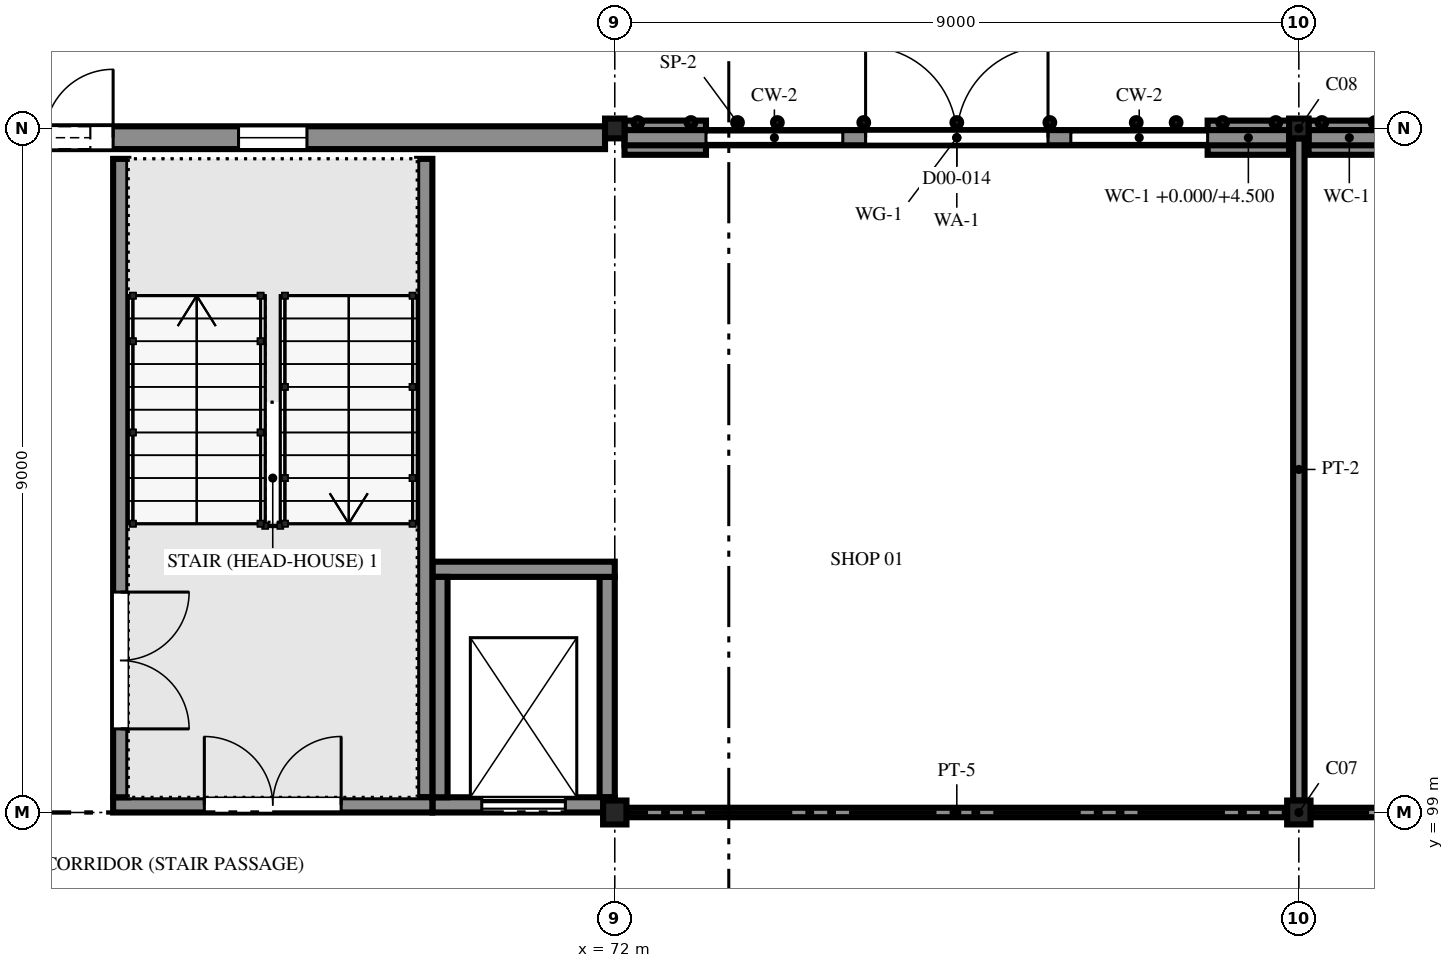
"""IFC4 building model, lengths in metres.
Left out: names, types, materials, properties, quantities, classifications, styles, units other than length and angle.
Written with IfcOpenShell. Run it as: python <this file> out.ifc"""

import sys

from ifc_helpers import new_model, si_unit, direction, frame, frame_2d, origin, origin_2d, place, context, subcontext, project, spatial, polyline, rectangle, i_section, outline, extrude, element, fill, save


model = new_model("IFC4")
c1 = context("Model", 3, precision=1e-05, world=origin(), true_north=direction((0.0, 1.0)))
c2 = subcontext(c1, "Body", "Model", "MODEL_VIEW")
j1 = project(units=[si_unit("LENGTHUNIT", "METRE"), si_unit("PLANEANGLEUNIT", "RADIAN")], contexts=[c1])
p1 = place(None, origin())
s1 = spatial("IfcSite", under=j1, at=p1, CompositionType="ELEMENT")
p2 = place(p1, origin())
s2 = spatial("IfcBuilding", under=s1, at=p2, CompositionType="ELEMENT")
p3 = place(p2, origin())
s3 = spatial("IfcBuildingStorey", under=s2, at=p3, CompositionType="ELEMENT", Elevation=0.0)
p4 = place(p3, frame((72.0, 99.0, -2.1), z_axis=(0.0, 0.0, 1.0), x_axis=(1.0, 0.0, 0.0)))
e1 = element("IfcColumn", 1, at=p4, inside=s3, PredefinedType="COLUMN", context=c2, shape_type="SweptSolid", body=[
    extrude(i_section(OverallWidth=0.307, OverallDepth=0.314, WebThickness=0.012, FlangeThickness=0.019, FilletRadius=0.015, at=origin_2d()), origin(), (0.0, 0.0, 1.0), 9.6),
])
p5 = place(p3, frame((72.0, 108.0, -2.1), z_axis=(0.0, 0.0, 1.0), x_axis=(1.0, 0.0, 0.0)))
e2 = element("IfcColumn", 2, at=p5, inside=s3, PredefinedType="COLUMN", context=c2, shape_type="SweptSolid", body=[
    extrude(i_section(OverallWidth=0.256, OverallDepth=0.26, WebThickness=0.01, FlangeThickness=0.017, FilletRadius=0.013, at=origin_2d()), origin(), (0.0, 0.0, 1.0), 9.6),
])
p6 = place(p3, frame((81.0, 99.0, -2.1), z_axis=(0.0, 0.0, 1.0), x_axis=(1.0, 0.0, 0.0)))
e3 = element("IfcColumn", 3, at=p6, inside=s3, PredefinedType="COLUMN", context=c2, shape_type="SweptSolid", body=[
    extrude(i_section(OverallWidth=0.307, OverallDepth=0.314, WebThickness=0.012, FlangeThickness=0.019, FilletRadius=0.015, at=origin_2d()), origin(), (0.0, 0.0, 1.0), 9.6),
])
p7 = place(p3, frame((81.0, 108.0, -2.1), z_axis=(0.0, 0.0, 1.0), x_axis=(1.0, 0.0, 0.0)))
e4 = element("IfcColumn", 4, at=p7, inside=s3, PredefinedType="COLUMN", context=c2, shape_type="SweptSolid", body=[
    extrude(i_section(OverallWidth=0.256, OverallDepth=0.26, WebThickness=0.01, FlangeThickness=0.017, FilletRadius=0.013, at=origin_2d()), origin(), (0.0, 0.0, 1.0), 9.6),
])
p8 = place(p3, frame((63.128, 107.878, 0.0), z_axis=(0.0, 0.0, 1.0), x_axis=(1.0, 0.0, 0.0)))
e5 = element("IfcWall", 5, at=p8, inside=s3, PredefinedType="SOLIDWALL", context=c2, shape_type="SweptSolid", body=[
    extrude(rectangle(XDim=8.744, YDim=0.3, at=frame_2d((4.372, 0.0))), origin(), (0.0, 0.0, 1.0), 6.692),
])
p9 = place(p8, frame((0.472, 0.0, 0.0)))
e6 = element("IfcOpeningElement", 6, at=p9, cuts=e5, PredefinedType="OPENING", context=c2, shape_type="SweptSolid", body=[
    extrude(rectangle(XDim=1.8, YDim=2.4, at=frame_2d((0.9, 1.2))), frame((0.0, 0.16, 0.0), z_axis=(0.0, -1.0, 0.0), x_axis=(1.0, 0.0, 0.0)), (0.0, 0.0, 1.0), 0.32),
])
p10 = place(p8, frame((0.772, 0.0, 2.55)))
e7 = element("IfcOpeningElement", 7, at=p10, cuts=e5, PredefinedType="OPENING", context=c2, shape_type="SweptSolid", body=[
    extrude(rectangle(XDim=1.2, YDim=0.6, at=frame_2d((0.6, 0.3))), frame((0.0, 0.16, 0.0), z_axis=(0.0, -1.0, 0.0), x_axis=(1.0, 0.0, 0.0)), (0.0, 0.0, 1.0), 0.32),
])
p11 = place(p8, frame((3.922, 0.0, 1.2)))
e8 = element("IfcOpeningElement", 8, at=p11, cuts=e5, PredefinedType="OPENING", context=c2, shape_type="SweptSolid", body=[
    extrude(rectangle(XDim=0.9, YDim=1.8, at=frame_2d((0.45, 0.9))), frame((0.0, 0.16, 0.0), z_axis=(0.0, -1.0, 0.0), x_axis=(1.0, 0.0, 0.0)), (0.0, 0.0, 1.0), 0.32),
])
p12 = place(p3, frame((72.128, 107.878, 0.0), z_axis=(0.0, 0.0, 1.0), x_axis=(1.0, 0.0, 0.0)))
e9 = element("IfcWall", 9, at=p12, inside=s3, PredefinedType="SOLIDWALL", context=c2, shape_type="SweptSolid", body=[
    extrude(rectangle(XDim=1.072, YDim=0.45, at=frame_2d((0.536, 0.0))), origin(), (0.0, 0.0, 1.0), 4.5),
])
p13 = place(p3, frame((75.0, 107.878, 0.0), z_axis=(0.0, 0.0, 1.0), x_axis=(1.0, 0.0, 0.0)))
e10 = element("IfcWall", 10, at=p13, inside=s3, PredefinedType="ELEMENTEDWALL", context=c2, shape_type="SweptSolid", body=[
    extrude(rectangle(XDim=3.0, YDim=0.15, at=frame_2d((1.5, 0.0))), origin(), (0.0, 0.0, 1.0), 4.5),
])
p14 = place(p13, frame((0.3, 0.0, 0.0)))
e11 = element("IfcOpeningElement", 11, at=p14, cuts=e10, PredefinedType="OPENING", context=c2, shape_type="SweptSolid", body=[
    extrude(rectangle(XDim=2.4, YDim=2.7, at=frame_2d((1.2, 1.35))), frame((0.0, 0.085, 0.0), z_axis=(0.0, -1.0, 0.0), x_axis=(1.0, 0.0, 0.0)), (0.0, 0.0, 1.0), 0.17),
])
p15 = place(p3, frame((79.8, 107.878, 0.0), z_axis=(0.0, 0.0, 1.0), x_axis=(1.0, 0.0, 0.0)))
e12 = element("IfcWall", 12, at=p15, inside=s3, PredefinedType="SOLIDWALL", context=c2, shape_type="SweptSolid", body=[
    extrude(rectangle(XDim=1.072, YDim=0.45, at=frame_2d((0.536, 0.0))), origin(), (0.0, 0.0, 1.0), 4.5),
])
p16 = place(p3, frame((72.128, 107.878, 4.9), z_axis=(0.0, 0.0, 1.0), x_axis=(1.0, 0.0, 0.0)))
e13 = element("IfcWall", 13, at=p16, inside=s3, PredefinedType="SOLIDWALL", context=c2, shape_type="SweptSolid", body=[
    extrude(rectangle(XDim=8.744, YDim=0.2, at=frame_2d((4.372, 0.0))), origin(), (0.0, 0.0, 1.0), 1.792),
])
p17 = place(p3, frame((81.128, 107.878, 0.0), z_axis=(0.0, 0.0, 1.0), x_axis=(1.0, 0.0, 0.0)))
e14 = element("IfcWall", 14, at=p17, inside=s3, PredefinedType="SOLIDWALL", context=c2, shape_type="SweptSolid", body=[
    extrude(rectangle(XDim=1.072, YDim=0.45, at=frame_2d((0.536, 0.0))), origin(), (0.0, 0.0, 1.0), 4.5),
])
p18 = place(p3, frame((81.128, 107.878, 4.9), z_axis=(0.0, 0.0, 1.0), x_axis=(1.0, 0.0, 0.0)))
e15 = element("IfcWall", 15, at=p18, inside=s3, PredefinedType="SOLIDWALL", context=c2, shape_type="SweptSolid", body=[
    extrude(rectangle(XDim=8.744, YDim=0.2, at=frame_2d((4.372, 0.0))), origin(), (0.0, 0.0, 1.0), 1.792),
])
p19 = place(p3, frame((65.4, 99.1, 0.0), z_axis=(0.0, 0.0, 1.0), x_axis=(1.0, 0.0, 0.0)))
e16 = element("IfcWall", 16, at=p19, inside=s3, PredefinedType="SOLIDWALL", context=c2, shape_type="SweptSolid", body=[
    extrude(rectangle(XDim=4.2, YDim=0.2, at=frame_2d((2.1, 0.0))), origin(), (0.0, 0.0, 1.0), 6.757),
])
p20 = place(p19, frame((1.2, 0.0, 0.0)))
e17 = element("IfcOpeningElement", 17, at=p20, cuts=e16, PredefinedType="OPENING", context=c2, shape_type="SweptSolid", body=[
    extrude(rectangle(XDim=1.8, YDim=2.1, at=frame_2d((0.9, 1.05))), frame((0.0, 0.11, 0.0), z_axis=(0.0, -1.0, 0.0), x_axis=(1.0, 0.0, 0.0)), (0.0, 0.0, 1.0), 0.22),
])
p21 = place(p3, frame((65.5, 99.2, 0.0), z_axis=(0.0, 0.0, 1.0), x_axis=(0.0, 1.0, 0.0)))
e18 = element("IfcWall", 18, at=p21, inside=s3, PredefinedType="SOLIDWALL", context=c2, shape_type="SweptSolid", body=[
    extrude(rectangle(XDim=8.4, YDim=0.2, at=frame_2d((4.2, 0.0))), origin(), (0.0, 0.0, 1.0), 6.757),
])
p22 = place(p21, frame((0.9, 0.0, 0.0)))
e19 = element("IfcOpeningElement", 19, at=p22, cuts=e18, PredefinedType="OPENING", context=c2, shape_type="SweptSolid", body=[
    extrude(rectangle(XDim=1.8, YDim=2.1, at=frame_2d((0.9, 1.05))), frame((0.0, 0.11, 0.0), z_axis=(0.0, -1.0, 0.0), x_axis=(1.0, 0.0, 0.0)), (0.0, 0.0, 1.0), 0.22),
])
p23 = place(p3, frame((69.5, 99.2, 0.0), z_axis=(0.0, 0.0, 1.0), x_axis=(0.0, 1.0, 0.0)))
e20 = element("IfcWall", 20, at=p23, inside=s3, PredefinedType="SOLIDWALL", context=c2, shape_type="SweptSolid", body=[
    extrude(rectangle(XDim=8.4, YDim=0.2, at=frame_2d((4.2, 0.0))), origin(), (0.0, 0.0, 1.0), 6.757),
])
p24 = place(p3, frame((69.602, 99.1, -1.6), z_axis=(0.0, 0.0, 1.0), x_axis=(1.0, 0.0, 0.0)))
e21 = element("IfcWall", 21, at=p24, inside=s3, PredefinedType="SOLIDWALL", context=c2, shape_type="SweptSolid", body=[
    extrude(rectangle(XDim=2.398, YDim=0.2, at=frame_2d((1.199, 0.0))), origin(), (0.0, 0.0, 1.0), 8.357),
])
p25 = place(p24, frame((0.648, 0.0, 1.6)))
e22 = element("IfcOpeningElement", 22, at=p25, cuts=e21, PredefinedType="OPENING", context=c2, shape_type="SweptSolid", body=[
    extrude(rectangle(XDim=1.1, YDim=2.1, at=frame_2d((0.55, 1.05))), frame((0.0, 0.11, 0.0), z_axis=(0.0, -1.0, 0.0), x_axis=(1.0, 0.0, 0.0)), (0.0, 0.0, 1.0), 0.22),
])
p26 = place(p3, frame((69.602, 102.2, -1.6), z_axis=(0.0, 0.0, 1.0), x_axis=(1.0, 0.0, 0.0)))
e23 = element("IfcWall", 23, at=p26, inside=s3, PredefinedType="SOLIDWALL", context=c2, shape_type="SweptSolid", body=[
    extrude(rectangle(XDim=2.398, YDim=0.2, at=frame_2d((1.199, 0.0))), origin(), (0.0, 0.0, 1.0), 8.357),
])
for number, where, z_axis, x_axis in (
    (24, (69.7, 99.2, -1.6), (0.0, 0.0, 1.0), (0.0, 1.0, 0.0)),
    (25, (71.9, 99.2, -1.6), (0.0, 0.0, 1.0), (0.0, 1.0, 0.0)),
):
    element("IfcWall", number, at=place(p3, frame(where, z_axis=z_axis, x_axis=x_axis)), inside=s3, PredefinedType="SOLIDWALL", context=c2, shape_type="SweptSolid", body=[
        extrude(rectangle(XDim=2.9, YDim=0.2, at=frame_2d((1.45, 0.0))), origin(), (0.0, 0.0, 1.0), 8.357),
    ])
for number, where, z_axis, x_axis in (
    (26, (72.154, 99.0, 0.0), (0.0, 0.0, 1.0), (1.0, 0.0, 0.0)),
    (27, (81.154, 99.0, 0.0), (0.0, 0.0, 1.0), (1.0, 0.0, 0.0)),
):
    element("IfcWall", number, at=place(p3, frame(where, z_axis=z_axis, x_axis=x_axis)), inside=s3, PredefinedType="PARTITIONING", context=c2, shape_type="SweptSolid", body=[
        extrude(rectangle(XDim=8.692, YDim=0.125, at=frame_2d((4.346, 0.0))), origin(), (0.0, 0.0, 1.0), 6.757),
    ])
p27 = place(p3, frame((81.0, 107.87, 0.0), z_axis=(0.0, 0.0, 1.0), x_axis=(0.0, -1.0, 0.0)))
e28 = element("IfcWall", 28, at=p27, inside=s3, PredefinedType="PARTITIONING", context=c2, shape_type="SweptSolid", body=[
    extrude(rectangle(XDim=8.713, YDim=0.15, at=frame_2d((4.356, 0.0))), origin(), (0.0, 0.0, 1.0), 6.6),
])
p28 = place(p9, origin())
e29 = element("IfcDoor", 29, at=p28, inside=s3, OperationType="DOUBLE_DOOR_SINGLE_SWING", PredefinedType="DOOR", context=c2, shape_type="SweptSolid", body=[
    extrude(outline(polyline([(0.0, 0.0), (0.07, 0.0), (0.07, 2.33), (1.73, 2.33), (1.73, 0.0), (1.8, 0.0), (1.8, 2.4), (0.0, 2.4), (0.0, 0.0)])), frame((0.0, 0.025, 0.0), z_axis=(0.0, -1.0, 0.0), x_axis=(1.0, 0.0, 0.0)), (0.0, 0.0, 1.0), 0.05),
    extrude(outline(polyline([(0.074, 0.01), (0.897, 0.01), (0.897, 2.326), (0.074, 2.326), (0.074, 0.01)]), holes=[polyline([(0.194, 0.16), (0.777, 0.16), (0.777, 1.01), (0.194, 1.01), (0.194, 0.16)]), polyline([(0.335, 1.16), (0.635, 1.16), (0.635, 1.76), (0.335, 1.76), (0.335, 1.16)])]), frame((0.0, 0.017, 0.0), z_axis=(0.0, -1.0, 0.0), x_axis=(1.0, 0.0, 0.0)), (0.0, 0.0, 1.0), 0.035),
    extrude(rectangle(XDim=0.583, YDim=0.85, at=frame_2d((0.485, 0.585))), frame((0.0, 0.009, 0.0), z_axis=(0.0, -1.0, 0.0), x_axis=(1.0, 0.0, 0.0)), (0.0, 0.0, 1.0), 0.017),
    extrude(rectangle(XDim=0.3, YDim=0.6, at=frame_2d((0.485, 1.46))), frame((0.0, 0.006, 0.0), z_axis=(0.0, -1.0, 0.0), x_axis=(1.0, 0.0, 0.0)), (0.0, 0.0, 1.0), 0.012),
    extrude(outline(polyline([(0.903, 0.01), (1.726, 0.01), (1.726, 2.326), (0.903, 2.326), (0.903, 0.01)]), holes=[polyline([(1.023, 0.16), (1.606, 0.16), (1.606, 1.01), (1.023, 1.01), (1.023, 0.16)]), polyline([(1.165, 1.16), (1.465, 1.16), (1.465, 1.76), (1.165, 1.76), (1.165, 1.16)])]), frame((0.0, 0.017, 0.0), z_axis=(0.0, -1.0, 0.0), x_axis=(1.0, 0.0, 0.0)), (0.0, 0.0, 1.0), 0.035),
    extrude(rectangle(XDim=0.583, YDim=0.85, at=frame_2d((1.314, 0.585))), frame((0.0, 0.009, 0.0), z_axis=(0.0, -1.0, 0.0), x_axis=(1.0, 0.0, 0.0)), (0.0, 0.0, 1.0), 0.017),
    extrude(rectangle(XDim=0.3, YDim=0.6, at=frame_2d((1.314, 1.46))), frame((0.0, 0.006, 0.0), z_axis=(0.0, -1.0, 0.0), x_axis=(1.0, 0.0, 0.0)), (0.0, 0.0, 1.0), 0.012),
])
fill(e6, e29)
p29 = place(p10, origin())
e30 = element("IfcWindow", 30, at=p29, inside=s3, PartitioningType="SINGLE_PANEL", PredefinedType="WINDOW", context=c2, shape_type="SweptSolid", body=[
    extrude(outline(polyline([(0.0, 0.0), (1.2, 0.0), (1.2, 0.6), (0.0, 0.6), (0.0, 0.0)]), holes=[polyline([(0.07, 0.07), (1.13, 0.07), (1.13, 0.53), (0.07, 0.53), (0.07, 0.07)])]), frame((0.0, 0.03, 0.0), z_axis=(0.0, -1.0, 0.0), x_axis=(1.0, 0.0, 0.0)), (0.0, 0.0, 1.0), 0.06),
    extrude(outline(polyline([(0.07, 0.07), (1.13, 0.07), (1.13, 0.53), (0.07, 0.53), (0.07, 0.07)]), holes=[polyline([(0.1, 0.1), (1.1, 0.1), (1.1, 0.5), (0.1, 0.5), (0.1, 0.1)])]), frame((0.0, 0.022, 0.0), z_axis=(0.0, -1.0, 0.0), x_axis=(1.0, 0.0, 0.0)), (0.0, 0.0, 1.0), 0.045),
    extrude(rectangle(XDim=1.0, YDim=0.4, at=frame_2d((0.6, 0.3))), frame((0.0, 0.006, 0.0), z_axis=(0.0, -1.0, 0.0), x_axis=(1.0, 0.0, 0.0)), (0.0, 0.0, 1.0), 0.012),
])
fill(e7, e30)
p30 = place(p11, origin())
e31 = element("IfcWindow", 31, at=p30, inside=s3, PartitioningType="SINGLE_PANEL", PredefinedType="WINDOW", context=c2, shape_type="SweptSolid", body=[
    extrude(outline(polyline([(0.0, 0.0), (0.9, 0.0), (0.9, 1.8), (0.0, 1.8), (0.0, 0.0)]), holes=[polyline([(0.07, 0.07), (0.83, 0.07), (0.83, 1.73), (0.07, 1.73), (0.07, 0.07)])]), frame((0.0, 0.03, 0.0), z_axis=(0.0, -1.0, 0.0), x_axis=(1.0, 0.0, 0.0)), (0.0, 0.0, 1.0), 0.06),
    extrude(outline(polyline([(0.07, 0.07), (0.83, 0.07), (0.83, 1.73), (0.07, 1.73), (0.07, 0.07)]), holes=[polyline([(0.1, 0.1), (0.8, 0.1), (0.8, 1.7), (0.1, 1.7), (0.1, 0.1)])]), frame((0.0, 0.022, 0.0), z_axis=(0.0, -1.0, 0.0), x_axis=(1.0, 0.0, 0.0)), (0.0, 0.0, 1.0), 0.045),
    extrude(rectangle(XDim=0.7, YDim=1.6, at=frame_2d((0.45, 0.9))), frame((0.0, 0.006, 0.0), z_axis=(0.0, -1.0, 0.0), x_axis=(1.0, 0.0, 0.0)), (0.0, 0.0, 1.0), 0.012),
])
fill(e8, e31)
p31 = place(p14, origin())
e32 = element("IfcDoor", 32, at=p31, inside=s3, OperationType="DOUBLE_DOOR_SINGLE_SWING", PredefinedType="DOOR", context=c2, shape_type="SweptSolid", body=[
    extrude(outline(polyline([(0.0, 0.0), (0.07, 0.0), (0.07, 2.63), (2.33, 2.63), (2.33, 0.0), (2.4, 0.0), (2.4, 2.7), (0.0, 2.7), (0.0, 0.0)])), frame((0.0, 0.025, 0.0), z_axis=(0.0, -1.0, 0.0), x_axis=(1.0, 0.0, 0.0)), (0.0, 0.0, 1.0), 0.05),
    extrude(outline(polyline([(0.074, 0.01), (1.197, 0.01), (1.197, 2.626), (0.074, 2.626), (0.074, 0.01)]), holes=[polyline([(0.164, 0.31), (1.107, 0.31), (1.107, 2.536), (0.164, 2.536), (0.164, 0.31)])]), frame((0.0, 0.017, 0.0), z_axis=(0.0, -1.0, 0.0), x_axis=(1.0, 0.0, 0.0)), (0.0, 0.0, 1.0), 0.035),
    extrude(rectangle(XDim=0.943, YDim=2.226, at=frame_2d((0.635, 1.423))), frame((0.0, 0.006, 0.0), z_axis=(0.0, -1.0, 0.0), x_axis=(1.0, 0.0, 0.0)), (0.0, 0.0, 1.0), 0.012),
    extrude(outline(polyline([(1.203, 0.01), (2.326, 0.01), (2.326, 2.626), (1.203, 2.626), (1.203, 0.01)]), holes=[polyline([(1.293, 0.31), (2.236, 0.31), (2.236, 2.536), (1.293, 2.536), (1.293, 0.31)])]), frame((0.0, 0.017, 0.0), z_axis=(0.0, -1.0, 0.0), x_axis=(1.0, 0.0, 0.0)), (0.0, 0.0, 1.0), 0.035),
    extrude(rectangle(XDim=0.943, YDim=2.226, at=frame_2d((1.764, 1.423))), frame((0.0, 0.006, 0.0), z_axis=(0.0, -1.0, 0.0), x_axis=(1.0, 0.0, 0.0)), (0.0, 0.0, 1.0), 0.012),
])
fill(e11, e32)
p32 = place(p25, origin())
e33 = element("IfcDoor", 33, at=p32, inside=s3, OperationType="SLIDING_TO_LEFT", PredefinedType="DOOR", context=c2, shape_type="SweptSolid", body=[
    extrude(outline(polyline([(0.0, 0.0), (0.07, 0.0), (0.07, 2.03), (1.03, 2.03), (1.03, 0.0), (1.1, 0.0), (1.1, 2.1), (0.0, 2.1), (0.0, 0.0)])), frame((0.0, 0.025, 0.0), z_axis=(0.0, -1.0, 0.0), x_axis=(1.0, 0.0, 0.0)), (0.0, 0.0, 1.0), 0.05),
    extrude(rectangle(XDim=0.524, YDim=2.016, at=frame_2d((0.336, 1.018))), frame((0.0, 0.018, 0.0), z_axis=(0.0, -1.0, 0.0), x_axis=(1.0, 0.0, 0.0)), (0.0, 0.0, 1.0), 0.016),
    extrude(rectangle(XDim=0.52, YDim=2.016, at=frame_2d((0.766, 1.018))), frame((0.0, -0.002, 0.0), z_axis=(0.0, -1.0, 0.0), x_axis=(1.0, 0.0, 0.0)), (0.0, 0.0, 1.0), 0.016),
])
fill(e22, e33)
p33 = place(p22, frame((1.8, 0.0, 0.0), z_axis=(0.0, 0.0, 1.0), x_axis=(-1.0, 0.0, 0.0)))
e34 = element("IfcDoor", 34, at=p33, inside=s3, OperationType="DOUBLE_DOOR_SINGLE_SWING", PredefinedType="DOOR", context=c2, shape_type="SweptSolid", body=[
    extrude(outline(polyline([(0.0, 0.0), (0.07, 0.0), (0.07, 2.03), (1.73, 2.03), (1.73, 0.0), (1.8, 0.0), (1.8, 2.1), (0.0, 2.1), (0.0, 0.0)])), frame((0.0, 0.025, 0.0), z_axis=(0.0, -1.0, 0.0), x_axis=(1.0, 0.0, 0.0)), (0.0, 0.0, 1.0), 0.05),
    extrude(outline(polyline([(0.074, 0.01), (0.897, 0.01), (0.897, 2.026), (0.074, 2.026), (0.074, 0.01)]), holes=[polyline([(0.194, 0.16), (0.777, 0.16), (0.777, 1.01), (0.194, 1.01), (0.194, 0.16)]), polyline([(0.335, 1.16), (0.635, 1.16), (0.635, 1.76), (0.335, 1.76), (0.335, 1.16)])]), frame((0.0, 0.017, 0.0), z_axis=(0.0, -1.0, 0.0), x_axis=(1.0, 0.0, 0.0)), (0.0, 0.0, 1.0), 0.035),
    extrude(rectangle(XDim=0.583, YDim=0.85, at=frame_2d((0.485, 0.585))), frame((0.0, 0.009, 0.0), z_axis=(0.0, -1.0, 0.0), x_axis=(1.0, 0.0, 0.0)), (0.0, 0.0, 1.0), 0.017),
    extrude(rectangle(XDim=0.3, YDim=0.6, at=frame_2d((0.485, 1.46))), frame((0.0, 0.006, 0.0), z_axis=(0.0, -1.0, 0.0), x_axis=(1.0, 0.0, 0.0)), (0.0, 0.0, 1.0), 0.012),
    extrude(outline(polyline([(0.903, 0.01), (1.726, 0.01), (1.726, 2.026), (0.903, 2.026), (0.903, 0.01)]), holes=[polyline([(1.023, 0.16), (1.606, 0.16), (1.606, 1.01), (1.023, 1.01), (1.023, 0.16)]), polyline([(1.165, 1.16), (1.465, 1.16), (1.465, 1.76), (1.165, 1.76), (1.165, 1.16)])]), frame((0.0, 0.017, 0.0), z_axis=(0.0, -1.0, 0.0), x_axis=(1.0, 0.0, 0.0)), (0.0, 0.0, 1.0), 0.035),
    extrude(rectangle(XDim=0.583, YDim=0.85, at=frame_2d((1.314, 0.585))), frame((0.0, 0.009, 0.0), z_axis=(0.0, -1.0, 0.0), x_axis=(1.0, 0.0, 0.0)), (0.0, 0.0, 1.0), 0.017),
    extrude(rectangle(XDim=0.3, YDim=0.6, at=frame_2d((1.314, 1.46))), frame((0.0, 0.006, 0.0), z_axis=(0.0, -1.0, 0.0), x_axis=(1.0, 0.0, 0.0)), (0.0, 0.0, 1.0), 0.012),
])
fill(e19, e34)
p34 = place(p20, origin())
e35 = element("IfcDoor", 35, at=p34, inside=s3, OperationType="DOUBLE_DOOR_SINGLE_SWING", PredefinedType="DOOR", context=c2, shape_type="SweptSolid", body=[
    extrude(outline(polyline([(0.0, 0.0), (0.07, 0.0), (0.07, 2.03), (1.73, 2.03), (1.73, 0.0), (1.8, 0.0), (1.8, 2.1), (0.0, 2.1), (0.0, 0.0)])), frame((0.0, 0.025, 0.0), z_axis=(0.0, -1.0, 0.0), x_axis=(1.0, 0.0, 0.0)), (0.0, 0.0, 1.0), 0.05),
    extrude(outline(polyline([(0.074, 0.01), (0.897, 0.01), (0.897, 2.026), (0.074, 2.026), (0.074, 0.01)]), holes=[polyline([(0.194, 0.16), (0.777, 0.16), (0.777, 1.01), (0.194, 1.01), (0.194, 0.16)]), polyline([(0.335, 1.16), (0.635, 1.16), (0.635, 1.76), (0.335, 1.76), (0.335, 1.16)])]), frame((0.0, 0.017, 0.0), z_axis=(0.0, -1.0, 0.0), x_axis=(1.0, 0.0, 0.0)), (0.0, 0.0, 1.0), 0.035),
    extrude(rectangle(XDim=0.583, YDim=0.85, at=frame_2d((0.485, 0.585))), frame((0.0, 0.009, 0.0), z_axis=(0.0, -1.0, 0.0), x_axis=(1.0, 0.0, 0.0)), (0.0, 0.0, 1.0), 0.017),
    extrude(rectangle(XDim=0.3, YDim=0.6, at=frame_2d((0.485, 1.46))), frame((0.0, 0.006, 0.0), z_axis=(0.0, -1.0, 0.0), x_axis=(1.0, 0.0, 0.0)), (0.0, 0.0, 1.0), 0.012),
    extrude(outline(polyline([(0.903, 0.01), (1.726, 0.01), (1.726, 2.026), (0.903, 2.026), (0.903, 0.01)]), holes=[polyline([(1.023, 0.16), (1.606, 0.16), (1.606, 1.01), (1.023, 1.01), (1.023, 0.16)]), polyline([(1.165, 1.16), (1.465, 1.16), (1.465, 1.76), (1.165, 1.76), (1.165, 1.16)])]), frame((0.0, 0.017, 0.0), z_axis=(0.0, -1.0, 0.0), x_axis=(1.0, 0.0, 0.0)), (0.0, 0.0, 1.0), 0.035),
    extrude(rectangle(XDim=0.583, YDim=0.85, at=frame_2d((1.314, 0.585))), frame((0.0, 0.009, 0.0), z_axis=(0.0, -1.0, 0.0), x_axis=(1.0, 0.0, 0.0)), (0.0, 0.0, 1.0), 0.017),
    extrude(rectangle(XDim=0.3, YDim=0.6, at=frame_2d((1.314, 1.46))), frame((0.0, 0.006, 0.0), z_axis=(0.0, -1.0, 0.0), x_axis=(1.0, 0.0, 0.0)), (0.0, 0.0, 1.0), 0.012),
])
fill(e17, e35)
save(model, sys.argv[1])
